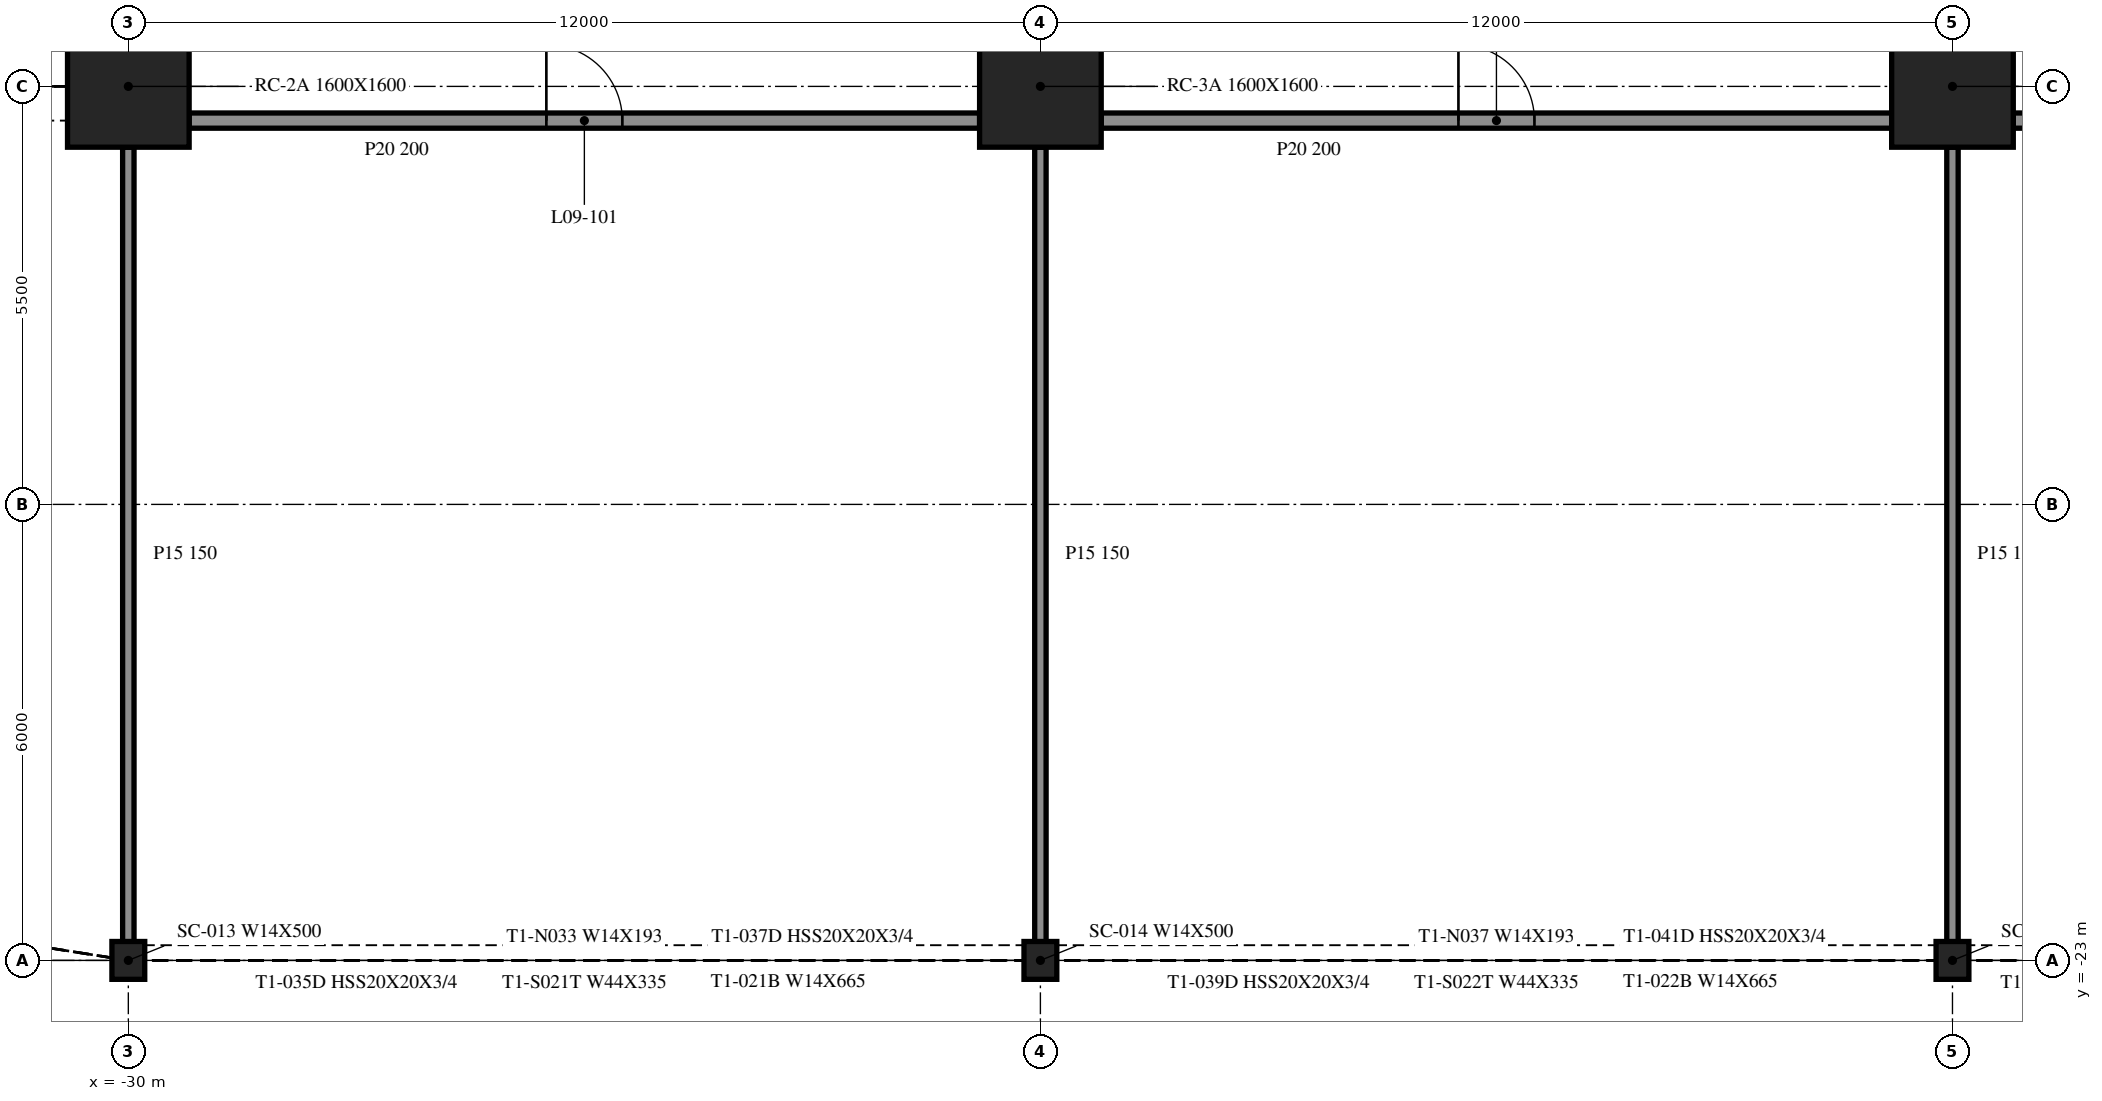
"""IFC4 building model, lengths in metres.
Left out: names, types, materials, properties, quantities, classifications, styles, units other than length and angle.
Written with IfcOpenShell. Run it as: python <this file> out.ifc"""

import sys

from ifc_helpers import new_model, si_unit, direction, frame, frame_2d, origin, origin_2d, place, context, subcontext, project, spatial, rectangle, i_section, extrude, element, fill, save


model = new_model("IFC4")
c1 = context("Model", 3, precision=1e-05, world=origin(), true_north=direction((0.0, 1.0)))
c2 = subcontext(c1, "Body", "Model", "MODEL_VIEW")
j1 = project(units=[si_unit("LENGTHUNIT", "METRE"), si_unit("PLANEANGLEUNIT", "RADIAN")], contexts=[c1])
p1 = place(None, origin())
s1 = spatial("IfcSite", under=j1, at=p1, CompositionType="ELEMENT")
p2 = place(p1, origin())
s2 = spatial("IfcBuilding", under=s1, at=p2, CompositionType="ELEMENT")
p3 = place(p2, frame((0.0, 0.0, 41.6)))
s3 = spatial("IfcBuildingStorey", under=s2, at=p3, CompositionType="ELEMENT", Elevation=41.6)
for number, where, z_axis, x_axis in (
    (1, (-30.0, -11.5, -0.55), (0.0, 0.0, 1.0), (1.0, 0.0, 0.0)),
    (2, (-18.0, -11.5, -0.55), (0.0, 0.0, 1.0), (1.0, 0.0, 0.0)),
    (3, (-6.0, -11.5, -0.55), (0.0, 0.0, 1.0), (1.0, 0.0, 0.0)),
):
    element("IfcColumn", number, at=place(p3, frame(where, z_axis=z_axis, x_axis=x_axis)), inside=s3, PredefinedType="COLUMN", context=c2, shape_type="SweptSolid", body=[
        extrude(rectangle(XDim=1.6, YDim=1.6, at=origin_2d()), origin(), (0.0, 0.0, 1.0), 4.61),
    ])
for number, where, z_axis, x_axis in (
    (4, (-30.0, -23.0, -0.55), (0.0, 0.0, 1.0), (1.0, 0.0, 0.0)),
    (5, (-18.0, -23.0, -0.55), (0.0, 0.0, 1.0), (1.0, 0.0, 0.0)),
    (6, (-6.0, -23.0, -0.55), (0.0, 0.0, 1.0), (1.0, 0.0, 0.0)),
):
    element("IfcColumn", number, at=place(p3, frame(where, z_axis=z_axis, x_axis=x_axis)), inside=s3, PredefinedType="COLUMN", context=c2, shape_type="SweptSolid", body=[
        extrude(i_section(OverallWidth=0.432, OverallDepth=0.498, WebThickness=0.056, FlangeThickness=0.089, at=origin_2d()), origin(), (0.0, 0.0, 1.0), 4.61),
    ])
p4 = place(p3, frame((-29.2, -11.95, 0.0), z_axis=(0.0, 0.0, 1.0), x_axis=(1.0, 0.0, 0.0)))
e7 = element("IfcWall", 7, at=p4, inside=s3, PredefinedType="PARTITIONING", context=c2, shape_type="SweptSolid", body=[
    extrude(rectangle(XDim=10.4, YDim=0.2, at=frame_2d((5.2, 0.0))), origin(), (0.0, 0.0, 1.0), 4.06),
])
p5 = place(p4, frame((4.7, 0.0, 0.0)))
e8 = element("IfcOpeningElement", 8, at=p5, cuts=e7, PredefinedType="OPENING", context=c2, shape_type="SweptSolid", body=[
    extrude(rectangle(XDim=1.0, YDim=2.1, at=frame_2d((0.5, 1.05))), frame((0.0, 0.11, 0.0), z_axis=(0.0, -1.0, 0.0), x_axis=(1.0, 0.0, 0.0)), (0.0, 0.0, 1.0), 0.22),
])
p6 = place(p3, frame((-17.2, -11.95, 0.0), z_axis=(0.0, 0.0, 1.0), x_axis=(1.0, 0.0, 0.0)))
e9 = element("IfcWall", 9, at=p6, inside=s3, PredefinedType="PARTITIONING", context=c2, shape_type="SweptSolid", body=[
    extrude(rectangle(XDim=10.4, YDim=0.2, at=frame_2d((5.2, 0.0))), origin(), (0.0, 0.0, 1.0), 4.06),
])
p7 = place(p6, frame((4.7, 0.0, 0.0)))
e10 = element("IfcOpeningElement", 10, at=p7, cuts=e9, PredefinedType="OPENING", context=c2, shape_type="SweptSolid", body=[
    extrude(rectangle(XDim=1.0, YDim=2.1, at=frame_2d((0.5, 1.05))), frame((0.0, 0.11, 0.0), z_axis=(0.0, -1.0, 0.0), x_axis=(1.0, 0.0, 0.0)), (0.0, 0.0, 1.0), 0.22),
])
p8 = place(p3, frame((-5.2, -11.95, 0.0), z_axis=(0.0, 0.0, 1.0), x_axis=(1.0, 0.0, 0.0)))
e11 = element("IfcWall", 11, at=p8, inside=s3, PredefinedType="PARTITIONING", context=c2, shape_type="SweptSolid", body=[
    extrude(rectangle(XDim=10.4, YDim=0.2, at=frame_2d((5.2, 0.0))), origin(), (0.0, 0.0, 1.0), 4.06),
])
p9 = place(p8, frame((4.7, 0.0, 0.0)))
e12 = element("IfcOpeningElement", 12, at=p9, cuts=e11, PredefinedType="OPENING", context=c2, shape_type="SweptSolid", body=[
    extrude(rectangle(XDim=0.9, YDim=2.1, at=frame_2d((0.45, 1.05))), frame((0.0, 0.11, 0.0), z_axis=(0.0, -1.0, 0.0), x_axis=(1.0, 0.0, 0.0)), (0.0, 0.0, 1.0), 0.22),
])
for number, where, z_axis, x_axis in (
    (13, (-30.0, -23.0, 0.0), (0.0, 0.0, 1.0), (0.0, 1.0, 0.0)),
    (14, (-18.0, -23.0, 0.0), (0.0, 0.0, 1.0), (0.0, 1.0, 0.0)),
    (15, (-6.0, -23.0, 0.0), (0.0, 0.0, 1.0), (0.0, 1.0, 0.0)),
):
    element("IfcWall", number, at=place(p3, frame(where, z_axis=z_axis, x_axis=x_axis)), inside=s3, PredefinedType="PARTITIONING", context=c2, shape_type="SweptSolid", body=[
        extrude(rectangle(XDim=10.7, YDim=0.15, at=frame_2d((5.35, 0.0))), origin(), (0.0, 0.0, 1.0), 4.06),
    ])
p10 = place(p5, origin())
e16 = element("IfcDoor", 16, at=p10, inside=s3, OperationType="SINGLE_SWING_RIGHT", PredefinedType="DOOR", context=c2, shape_type="SweptSolid", body=[
    extrude(rectangle(XDim=1.0, YDim=2.1, at=frame_2d((0.5, 1.05))), frame((0.0, 0.025, 0.0), z_axis=(0.0, -1.0, 0.0), x_axis=(1.0, 0.0, 0.0)), (0.0, 0.0, 1.0), 0.05),
])
fill(e8, e16)
p11 = place(p7, origin())
e17 = element("IfcDoor", 17, at=p11, inside=s3, OperationType="SINGLE_SWING_LEFT", PredefinedType="DOOR", context=c2, shape_type="SweptSolid", body=[
    extrude(rectangle(XDim=1.0, YDim=2.1, at=frame_2d((0.5, 1.05))), frame((0.0, 0.025, 0.0), z_axis=(0.0, -1.0, 0.0), x_axis=(1.0, 0.0, 0.0)), (0.0, 0.0, 1.0), 0.05),
])
fill(e10, e17)
save(model, sys.argv[1])
